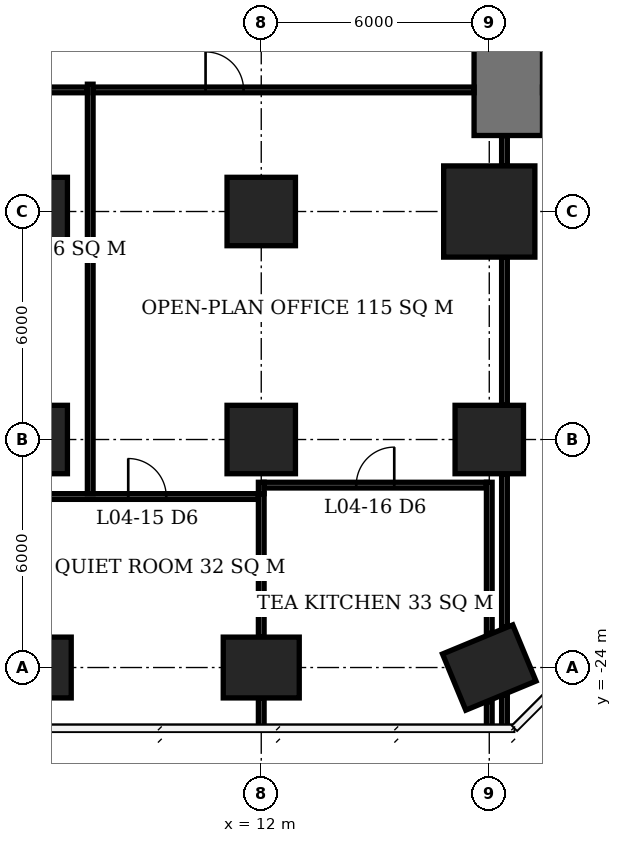
"""IFC4 building model, lengths in metres.
Left out: names, types, materials, properties, quantities, classifications, styles, units other than length and angle.
Written with IfcOpenShell. Run it as: python <this file> out.ifc"""

import sys

from ifc_helpers import new_model, si_unit, direction, frame, frame_2d, origin, origin_2d, place, context, subcontext, project, spatial, rectangle, extrude, element, fill, save


model = new_model("IFC4")
c1 = context("Model", 3, precision=1e-05, world=origin(), true_north=direction((0.0, 1.0)))
c2 = subcontext(c1, "Body", "Model", "MODEL_VIEW")
j1 = project(units=[si_unit("LENGTHUNIT", "METRE"), si_unit("PLANEANGLEUNIT", "RADIAN")], contexts=[c1])
p1 = place(None, origin())
s1 = spatial("IfcSite", under=j1, at=p1, CompositionType="ELEMENT")
p2 = place(p1, origin())
s2 = spatial("IfcBuilding", under=s1, at=p2, CompositionType="ELEMENT")
p3 = place(p2, frame((0.0, 0.0, 22.1)))
s3 = spatial("IfcBuildingStorey", under=s2, at=p3, CompositionType="ELEMENT", Elevation=22.1)
p4 = place(p3, frame((6.0, -24.0, 0.0), z_axis=(0.0, 0.0, 1.0), x_axis=(1.0, 0.0, 0.0)))
e1 = element("IfcColumn", 1, at=p4, inside=s3, PredefinedType="COLUMN", context=c2, shape_type="SweptSolid", body=[
    extrude(rectangle(XDim=2.0, YDim=1.6, at=origin_2d()), origin(), (0.0, 0.0, 1.0), 3.9),
])
p5 = place(p3, frame((6.0, -18.0, -0.55), z_axis=(0.0, 0.0, 1.0), x_axis=(1.0, 0.0, 0.0)))
e2 = element("IfcColumn", 2, at=p5, inside=s3, PredefinedType="COLUMN", context=c2, shape_type="SweptSolid", body=[
    extrude(rectangle(XDim=1.8, YDim=1.8, at=origin_2d()), origin(), (0.0, 0.0, 1.0), 4.45),
])
p6 = place(p3, frame((6.0, -12.0, 0.0), z_axis=(0.0, 0.0, 1.0), x_axis=(1.0, 0.0, 0.0)))
e3 = element("IfcColumn", 3, at=p6, inside=s3, PredefinedType="COLUMN", context=c2, shape_type="SweptSolid", body=[
    extrude(rectangle(XDim=1.8, YDim=1.8, at=origin_2d()), origin(), (0.0, 0.0, 1.0), 3.9),
])
p7 = place(p3, frame((12.0, -24.0, 0.0), z_axis=(0.0, 0.0, 1.0), x_axis=(1.0, 0.0, 0.0)))
e4 = element("IfcColumn", 4, at=p7, inside=s3, PredefinedType="COLUMN", context=c2, shape_type="SweptSolid", body=[
    extrude(rectangle(XDim=2.0, YDim=1.6, at=origin_2d()), origin(), (0.0, 0.0, 1.0), 3.9),
])
p8 = place(p3, frame((12.0, -18.0, -0.55), z_axis=(0.0, 0.0, 1.0), x_axis=(1.0, 0.0, 0.0)))
e5 = element("IfcColumn", 5, at=p8, inside=s3, PredefinedType="COLUMN", context=c2, shape_type="SweptSolid", body=[
    extrude(rectangle(XDim=1.8, YDim=1.8, at=origin_2d()), origin(), (0.0, 0.0, 1.0), 4.45),
])
p9 = place(p3, frame((12.0, -12.0, 0.0), z_axis=(0.0, 0.0, 1.0), x_axis=(1.0, 0.0, 0.0)))
e6 = element("IfcColumn", 6, at=p9, inside=s3, PredefinedType="COLUMN", context=c2, shape_type="SweptSolid", body=[
    extrude(rectangle(XDim=1.8, YDim=1.8, at=origin_2d()), origin(), (0.0, 0.0, 1.0), 3.9),
])
p10 = place(p3, frame((18.0, -24.0, 0.0), z_axis=(0.0, 0.0, 1.0), x_axis=(-0.923879532511, -0.382683432365, 0.0)))
e7 = element("IfcColumn", 7, at=p10, inside=s3, PredefinedType="COLUMN", context=c2, shape_type="SweptSolid", body=[
    extrude(rectangle(XDim=2.0, YDim=1.6, at=origin_2d()), origin(), (0.0, 0.0, 1.0), 3.9),
])
p11 = place(p3, frame((18.0, -18.0, -0.55), z_axis=(0.0, 0.0, 1.0), x_axis=(1.0, 0.0, 0.0)))
e8 = element("IfcColumn", 8, at=p11, inside=s3, PredefinedType="COLUMN", context=c2, shape_type="SweptSolid", body=[
    extrude(rectangle(XDim=1.8, YDim=1.8, at=origin_2d()), origin(), (0.0, 0.0, 1.0), 4.45),
])
p12 = place(p3, frame((18.0, -12.0, 0.0), z_axis=(0.0, 0.0, 1.0), x_axis=(1.0, 0.0, 0.0)))
e9 = element("IfcColumn", 9, at=p12, inside=s3, PredefinedType="COLUMN", context=c2, shape_type="SweptSolid", body=[
    extrude(rectangle(XDim=2.4, YDim=2.4, at=origin_2d()), origin(), (0.0, 0.0, 1.0), 3.9),
])
p13 = place(p3, frame((18.5, -10.0, 0.0), z_axis=(0.0, 0.0, 1.0), x_axis=(0.0, 1.0, 0.0)))
e10 = element("IfcWall", 10, at=p13, inside=s3, PredefinedType="SHEAR", context=c2, shape_type="SweptSolid", body=[
    extrude(rectangle(XDim=2.4, YDim=1.8, at=frame_2d((1.2, 0.0))), origin(), (0.0, 0.0, 1.0), 3.9),
])
p14 = place(p3, frame((6.075, -19.5, 0.0), z_axis=(0.0, 0.0, 1.0), x_axis=(1.0, 0.0, 0.0)))
e11 = element("IfcWall", 11, at=p14, inside=s3, PredefinedType="PARTITIONING", context=c2, shape_type="SweptSolid", body=[
    extrude(rectangle(XDim=5.85, YDim=0.15, at=frame_2d((2.925, 0.0))), origin(), (0.0, 0.0, 1.0), 3.65),
])
p15 = place(p14, frame((2.425, 0.0, 0.0)))
e12 = element("IfcOpeningElement", 12, at=p15, cuts=e11, PredefinedType="OPENING", context=c2, shape_type="SweptSolid", body=[
    extrude(rectangle(XDim=1.0, YDim=2.1, at=frame_2d((0.5, 1.05))), frame((0.0, 0.085, 0.0), z_axis=(0.0, -1.0, 0.0), x_axis=(1.0, 0.0, 0.0)), (0.0, 0.0, 1.0), 0.17),
])
p16 = place(p3, frame((12.075, -19.2, 0.0), z_axis=(0.0, 0.0, 1.0), x_axis=(1.0, 0.0, 0.0)))
e13 = element("IfcWall", 13, at=p16, inside=s3, PredefinedType="PARTITIONING", context=c2, shape_type="SweptSolid", body=[
    extrude(rectangle(XDim=5.85, YDim=0.15, at=frame_2d((2.925, 0.0))), origin(), (0.0, 0.0, 1.0), 3.65),
])
p17 = place(p16, frame((2.425, 0.0, 0.0)))
e14 = element("IfcOpeningElement", 14, at=p17, cuts=e13, PredefinedType="OPENING", context=c2, shape_type="SweptSolid", body=[
    extrude(rectangle(XDim=1.0, YDim=2.1, at=frame_2d((0.5, 1.05))), frame((0.0, 0.085, 0.0), z_axis=(0.0, -1.0, 0.0), x_axis=(1.0, 0.0, 0.0)), (0.0, 0.0, 1.0), 0.17),
])
p18 = place(p3, frame((12.0, -25.6, 0.0), z_axis=(0.0, 0.0, 1.0), x_axis=(0.0, 1.0, 0.0)))
e15 = element("IfcWall", 15, at=p18, inside=s3, PredefinedType="PARTITIONING", context=c2, shape_type="SweptSolid", body=[
    extrude(rectangle(XDim=0.8, YDim=0.15, at=frame_2d((0.4, 0.0))), origin(), (0.0, 0.0, 1.0), 3.65),
])
p19 = place(p3, frame((12.0, -23.2, 0.0), z_axis=(0.0, 0.0, 1.0), x_axis=(0.0, 1.0, 0.0)))
e16 = element("IfcWall", 16, at=p19, inside=s3, PredefinedType="PARTITIONING", context=c2, shape_type="SweptSolid", body=[
    extrude(rectangle(XDim=3.775, YDim=0.15, at=frame_2d((1.887, 0.0))), origin(), (0.0, 0.0, 1.0), 3.65),
])
p20 = place(p3, frame((12.0, -19.425, 0.0), z_axis=(0.0, 0.0, 1.0), x_axis=(0.0, 1.0, 0.0)))
e17 = element("IfcWall", 17, at=p20, inside=s3, PredefinedType="PARTITIONING", context=c2, shape_type="SweptSolid", body=[
    extrude(rectangle(XDim=0.3, YDim=0.15, at=frame_2d((0.15, 0.0))), origin(), (0.0, 0.0, 1.0), 3.65),
])
p21 = place(p3, frame((18.0, -25.6, 0.0), z_axis=(0.0, 0.0, 1.0), x_axis=(0.0, 1.0, 0.0)))
e18 = element("IfcWall", 18, at=p21, inside=s3, PredefinedType="PARTITIONING", context=c2, shape_type="SweptSolid", body=[
    extrude(rectangle(XDim=0.703, YDim=0.15, at=frame_2d((0.352, 0.0))), origin(), (0.0, 0.0, 1.0), 3.65),
])
p22 = place(p3, frame((18.0, -23.103, 0.0), z_axis=(0.0, 0.0, 1.0), x_axis=(0.0, 1.0, 0.0)))
e19 = element("IfcWall", 19, at=p22, inside=s3, PredefinedType="PARTITIONING", context=c2, shape_type="SweptSolid", body=[
    extrude(rectangle(XDim=3.978, YDim=0.15, at=frame_2d((1.989, 0.0))), origin(), (0.0, 0.0, 1.0), 3.65),
])
p23 = place(p3, frame((1.575, -8.8, 0.0), z_axis=(0.0, 0.0, 1.0), x_axis=(1.0, 0.0, 0.0)))
e20 = element("IfcWall", 20, at=p23, inside=s3, PredefinedType="PARTITIONING", context=c2, shape_type="SweptSolid", body=[
    extrude(rectangle(XDim=5.85, YDim=0.15, at=frame_2d((2.925, 0.0))), origin(), (0.0, 0.0, 1.0), 3.65),
])
p24 = place(p23, frame((1.525, 0.0, 0.0)))
e21 = element("IfcOpeningElement", 21, at=p24, cuts=e20, PredefinedType="OPENING", context=c2, shape_type="SweptSolid", body=[
    extrude(rectangle(XDim=1.0, YDim=2.1, at=frame_2d((0.5, 1.05))), frame((0.0, 0.085, 0.0), z_axis=(0.0, -1.0, 0.0), x_axis=(1.0, 0.0, 0.0)), (0.0, 0.0, 1.0), 0.17),
])
p25 = place(p3, frame((7.5, -19.425, 0.0), z_axis=(0.0, 0.0, 1.0), x_axis=(0.0, 1.0, 0.0)))
e22 = element("IfcWall", 22, at=p25, inside=s3, PredefinedType="PARTITIONING", context=c2, shape_type="SweptSolid", body=[
    extrude(rectangle(XDim=10.775, YDim=0.15, at=frame_2d((5.388, 0.0))), origin(), (0.0, 0.0, 1.0), 3.65),
])
p26 = place(p3, frame((7.575, -8.8, 0.0), z_axis=(0.0, 0.0, 1.0), x_axis=(1.0, 0.0, 0.0)))
e23 = element("IfcWall", 23, at=p26, inside=s3, PredefinedType="PARTITIONING", context=c2, shape_type="SweptSolid", body=[
    extrude(rectangle(XDim=10.025, YDim=0.15, at=frame_2d((5.013, 0.0))), origin(), (0.0, 0.0, 1.0), 3.65),
])
p27 = place(p26, frame((2.96, 0.0, 0.0)))
e24 = element("IfcOpeningElement", 24, at=p27, cuts=e23, PredefinedType="OPENING", context=c2, shape_type="SweptSolid", body=[
    extrude(rectangle(XDim=1.0, YDim=2.1, at=frame_2d((0.5, 1.05))), frame((0.0, 0.085, 0.0), z_axis=(0.0, -1.0, 0.0), x_axis=(1.0, 0.0, 0.0)), (0.0, 0.0, 1.0), 0.17),
])
p28 = place(p3, frame((18.4, -25.6, 0.0), z_axis=(0.0, 0.0, 1.0), x_axis=(0.0, 1.0, 0.0)))
e25 = element("IfcWall", 25, at=p28, inside=s3, PredefinedType="PARTITIONING", context=c2, shape_type="SweptSolid", body=[
    extrude(rectangle(XDim=0.869, YDim=0.15, at=frame_2d((0.435, 0.0))), origin(), (0.0, 0.0, 1.0), 3.65),
])
p29 = place(p3, frame((18.4, -22.937, 0.0), z_axis=(0.0, 0.0, 1.0), x_axis=(0.0, 1.0, 0.0)))
e26 = element("IfcWall", 26, at=p29, inside=s3, PredefinedType="PARTITIONING", context=c2, shape_type="SweptSolid", body=[
    extrude(rectangle(XDim=4.037, YDim=0.15, at=frame_2d((2.019, 0.0))), origin(), (0.0, 0.0, 1.0), 3.65),
])
p30 = place(p3, frame((18.4, -17.1, 0.0), z_axis=(0.0, 0.0, 1.0), x_axis=(0.0, 1.0, 0.0)))
e27 = element("IfcWall", 27, at=p30, inside=s3, PredefinedType="PARTITIONING", context=c2, shape_type="SweptSolid", body=[
    extrude(rectangle(XDim=3.9, YDim=0.15, at=frame_2d((1.95, 0.0))), origin(), (0.0, 0.0, 1.0), 3.65),
])
p31 = place(p3, frame((18.4, -10.8, 0.0), z_axis=(0.0, 0.0, 1.0), x_axis=(0.0, 1.0, 0.0)))
e28 = element("IfcWall", 28, at=p31, inside=s3, PredefinedType="PARTITIONING", context=c2, shape_type="SweptSolid", body=[
    extrude(rectangle(XDim=0.8, YDim=0.15, at=frame_2d((0.4, 0.0))), origin(), (0.0, 0.0, 1.0), 3.65),
])
p32 = place(p15, origin())
e29 = element("IfcDoor", 29, at=p32, inside=s3, OperationType="SINGLE_SWING_LEFT", PredefinedType="DOOR", context=c2, shape_type="SweptSolid", body=[
    extrude(rectangle(XDim=1.0, YDim=2.1, at=frame_2d((0.5, 1.05))), frame((0.0, 0.025, 0.0), z_axis=(0.0, -1.0, 0.0), x_axis=(1.0, 0.0, 0.0)), (0.0, 0.0, 1.0), 0.05),
])
fill(e12, e29)
p33 = place(p17, origin())
e30 = element("IfcDoor", 30, at=p33, inside=s3, OperationType="SINGLE_SWING_RIGHT", PredefinedType="DOOR", context=c2, shape_type="SweptSolid", body=[
    extrude(rectangle(XDim=1.0, YDim=2.1, at=frame_2d((0.5, 1.05))), frame((0.0, 0.025, 0.0), z_axis=(0.0, -1.0, 0.0), x_axis=(1.0, 0.0, 0.0)), (0.0, 0.0, 1.0), 0.05),
])
fill(e14, e30)
p34 = place(p27, origin())
e31 = element("IfcDoor", 31, at=p34, inside=s3, OperationType="SINGLE_SWING_LEFT", PredefinedType="DOOR", context=c2, shape_type="SweptSolid", body=[
    extrude(rectangle(XDim=1.0, YDim=2.1, at=frame_2d((0.5, 1.05))), frame((0.0, 0.025, 0.0), z_axis=(0.0, -1.0, 0.0), x_axis=(1.0, 0.0, 0.0)), (0.0, 0.0, 1.0), 0.05),
])
fill(e24, e31)
save(model, sys.argv[1])
